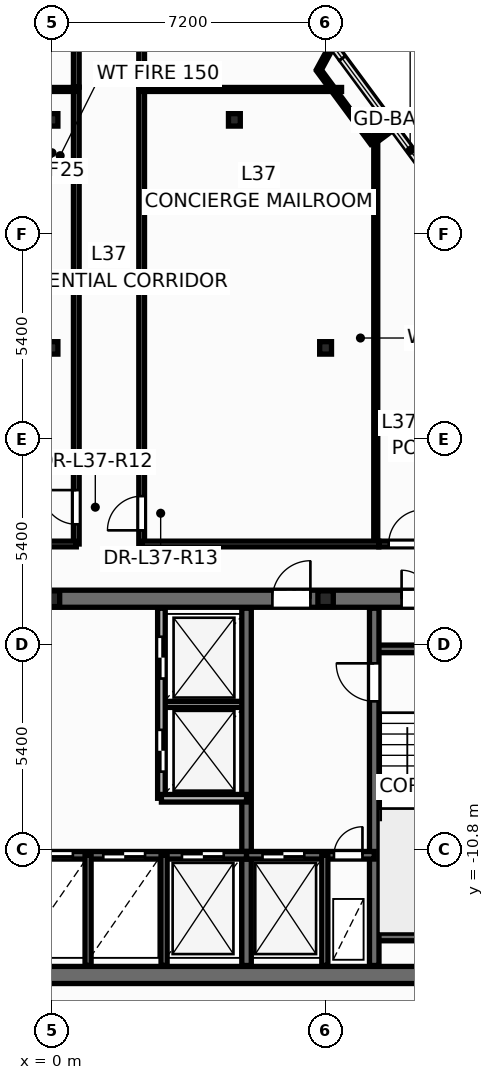
"""IFC4 building model, lengths in metres.
Left out: names, types, materials, properties, quantities, classifications, styles, units other than length and angle.
Written with IfcOpenShell. Run it as: python <this file> out.ifc"""

import sys

from ifc_helpers import new_model, si_unit, direction, frame, frame_2d, origin, origin_2d, place, context, subcontext, project, spatial, rectangle, i_section, extrude, element, fill, save


model = new_model("IFC4")
c1 = context("Model", 3, precision=1e-05, world=origin(), true_north=direction((0.0, 1.0)))
c2 = subcontext(c1, "Body", "Model", "MODEL_VIEW")
j1 = project(units=[si_unit("LENGTHUNIT", "METRE"), si_unit("PLANEANGLEUNIT", "RADIAN")], contexts=[c1])
p1 = place(None, origin())
s1 = spatial("IfcSite", under=j1, at=p1, CompositionType="ELEMENT")
p2 = place(p1, origin())
s2 = spatial("IfcBuilding", under=s1, at=p2, CompositionType="ELEMENT")
p3 = place(p2, frame((0.0, 0.0, 143.7)))
s3 = spatial("IfcBuildingStorey", under=s2, at=p3, CompositionType="ELEMENT", Elevation=143.7)
for number, where, z_axis, x_axis in (
    (1, (0.0, -4.2, 0.0), (0.0, 0.0, 1.0), (1.0, 0.0, 0.0)),
    (2, (7.2, -4.2, 0.0), (0.0, 0.0, 1.0), (1.0, 0.0, 0.0)),
):
    element("IfcColumn", number, at=place(p3, frame(where, z_axis=z_axis, x_axis=x_axis)), inside=s3, PredefinedType="PILASTER", context=c2, shape_type="SweptSolid", body=[
        extrude(i_section(OverallWidth=0.405, OverallDepth=0.414, WebThickness=0.022, FlangeThickness=0.032, at=origin_2d()), origin(), (0.0, 0.0, 1.0), 3.6),
    ])
for number, where, z_axis, x_axis in (
    (3, (0.0, 2.4, 0.0), (0.0, 0.0, 1.0), (1.0, 0.0, 0.0)),
    (4, (7.2, 2.4, 0.0), (0.0, 0.0, 1.0), (1.0, 0.0, 0.0)),
    (5, (0.0, 8.4, 0.0), (0.0, 0.0, 1.0), (1.0, 0.0, 0.0)),
    (6, (4.8, 8.4, 0.0), (0.0, 0.0, 1.0), (1.0, 0.0, 0.0)),
):
    element("IfcColumn", number, at=place(p3, frame(where, z_axis=z_axis, x_axis=x_axis)), inside=s3, PredefinedType="COLUMN", context=c2, shape_type="SweptSolid", body=[
        extrude(i_section(OverallWidth=0.311, OverallDepth=0.327, WebThickness=0.016, FlangeThickness=0.025, at=origin_2d()), origin(), (0.0, 0.0, 1.0), 3.6),
    ])
p4 = place(p3, frame((2.88, -6.98, 0.0), z_axis=(0.0, 0.0, 1.0), x_axis=(1.0, 0.0, 0.0)))
e7 = element("IfcWall", 7, at=p4, inside=s3, PredefinedType="PARTITIONING", context=c2, shape_type="SweptSolid", body=[
    extrude(rectangle(XDim=2.24, YDim=0.16, at=frame_2d((1.12, 0.0))), origin(), (0.0, 0.0, 1.0), 3.35),
])
p5 = place(p3, frame((-12.65, -14.1, 0.0), z_axis=(0.0, 0.0, 1.0), x_axis=(1.0, 0.0, 0.0)))
e8 = element("IfcWall", 8, at=p5, inside=s3, PredefinedType="SHEAR", context=c2, shape_type="SweptSolid", body=[
    extrude(rectangle(XDim=25.3, YDim=0.45, at=frame_2d((12.65, 0.0))), origin(), (0.0, 0.0, 1.0), 3.6),
])
p6 = place(p3, frame((-12.65, -4.2, 0.0), z_axis=(0.0, 0.0, 1.0), x_axis=(1.0, 0.0, 0.0)))
e9 = element("IfcWall", 9, at=p6, inside=s3, PredefinedType="SHEAR", context=c2, shape_type="SweptSolid", body=[
    extrude(rectangle(XDim=25.3, YDim=0.45, at=frame_2d((12.65, 0.0))), origin(), (0.0, 0.0, 1.0), 3.6),
])
p7 = place(p6, frame((1.85, 0.0, 0.0)))
e10 = element("IfcOpeningElement", 10, at=p7, cuts=e9, PredefinedType="OPENING", context=c2, shape_type="SweptSolid", body=[
    extrude(rectangle(XDim=0.756, YDim=2.054, at=frame_2d((0.375, 1.027))), frame((0.0, 0.235, 0.0), z_axis=(0.0, -1.0, 0.0), x_axis=(1.0, 0.0, 0.0)), (0.0, 0.0, 1.0), 0.47),
])
p8 = place(p6, frame((21.85, 0.0, 0.0)))
e11 = element("IfcOpeningElement", 11, at=p8, cuts=e9, PredefinedType="OPENING", context=c2, shape_type="SweptSolid", body=[
    extrude(rectangle(XDim=0.756, YDim=2.054, at=frame_2d((0.375, 1.027))), frame((0.0, 0.235, 0.0), z_axis=(0.0, -1.0, 0.0), x_axis=(1.0, 0.0, 0.0)), (0.0, 0.0, 1.0), 0.47),
])
p9 = place(p6, frame((23.5, 0.0, 0.0)))
e12 = element("IfcOpeningElement", 12, at=p9, cuts=e9, PredefinedType="OPENING", context=c2, shape_type="SweptSolid", body=[
    extrude(rectangle(XDim=0.756, YDim=2.054, at=frame_2d((0.375, 1.027))), frame((0.0, 0.235, 0.0), z_axis=(0.0, -1.0, 0.0), x_axis=(1.0, 0.0, 0.0)), (0.0, 0.0, 1.0), 0.47),
])
p10 = place(p6, frame((5.85, 0.0, 0.0)))
e13 = element("IfcOpeningElement", 13, at=p10, cuts=e9, PredefinedType="OPENING", context=c2, shape_type="SweptSolid", body=[
    extrude(rectangle(XDim=1.006, YDim=2.104, at=frame_2d((0.5, 1.052))), frame((0.0, 0.235, 0.0), z_axis=(0.0, -1.0, 0.0), x_axis=(1.0, 0.0, 0.0)), (0.0, 0.0, 1.0), 0.47),
])
p11 = place(p6, frame((10.35, 0.0, 0.0)))
e14 = element("IfcOpeningElement", 14, at=p11, cuts=e9, PredefinedType="OPENING", context=c2, shape_type="SweptSolid", body=[
    extrude(rectangle(XDim=1.406, YDim=2.154, at=frame_2d((0.7, 1.077))), frame((0.0, 0.235, 0.0), z_axis=(0.0, -1.0, 0.0), x_axis=(1.0, 0.0, 0.0)), (0.0, 0.0, 1.0), 0.47),
])
p12 = place(p6, frame((18.45, 0.0, 0.0)))
e15 = element("IfcOpeningElement", 15, at=p12, cuts=e9, PredefinedType="OPENING", context=c2, shape_type="SweptSolid", body=[
    extrude(rectangle(XDim=1.006, YDim=2.104, at=frame_2d((0.5, 1.052))), frame((0.0, 0.235, 0.0), z_axis=(0.0, -1.0, 0.0), x_axis=(1.0, 0.0, 0.0)), (0.0, 0.0, 1.0), 0.47),
])
for number, where, z_axis, x_axis in (
    (16, (8.48, -5.52, 0.0), (0.0, 0.0, 1.0), (1.0, 0.0, 0.0)),
    (17, (8.48, -13.1, 0.0), (0.0, 0.0, 1.0), (1.0, 0.0, 0.0)),
):
    element("IfcWall", number, at=place(p3, frame(where, z_axis=z_axis, x_axis=x_axis)), inside=s3, PredefinedType="SOLIDWALL", context=c2, shape_type="SweptSolid", body=[
        extrude(rectangle(XDim=3.87, YDim=0.2, at=frame_2d((1.935, 0.0))), origin(), (0.0, 0.0, 1.0), 3.6),
    ])
p13 = place(p3, frame((8.48, -13.85, 0.0), z_axis=(0.0, 0.0, 1.0), x_axis=(0.0, 1.0, 0.0)))
e18 = element("IfcWall", 18, at=p13, inside=s3, PredefinedType="SHEAR", context=c2, shape_type="SweptSolid", body=[
    extrude(rectangle(XDim=9.4, YDim=0.25, at=frame_2d((4.7, 0.0))), origin(), (0.0, 0.0, 1.0), 3.6),
])
p14 = place(p13, frame((6.95, 0.0, 0.0)))
e19 = element("IfcOpeningElement", 19, at=p14, cuts=e18, PredefinedType="OPENING", context=c2, shape_type="SweptSolid", body=[
    extrude(rectangle(XDim=1.006, YDim=2.104, at=frame_2d((0.5, 1.052))), frame((0.0, 0.135, 0.0), z_axis=(0.0, -1.0, 0.0), x_axis=(1.0, 0.0, 0.0)), (0.0, 0.0, 1.0), 0.27),
])
p15 = place(p3, frame((5.12, -13.85, 0.0), z_axis=(0.0, 0.0, 1.0), x_axis=(0.0, 1.0, 0.0)))
e20 = element("IfcWall", 20, at=p15, inside=s3, PredefinedType="SHEAR", context=c2, shape_type="SweptSolid", body=[
    extrude(rectangle(XDim=9.4, YDim=0.25, at=frame_2d((4.7, 0.0))), origin(), (0.0, 0.0, 1.0), 3.6),
])
p16 = place(p3, frame((-5.12, -10.95, 0.0), z_axis=(0.0, 0.0, 1.0), x_axis=(1.0, 0.0, 0.0)))
e21 = element("IfcWall", 21, at=p16, inside=s3, PredefinedType="SOLIDWALL", context=c2, shape_type="SweptSolid", body=[
    extrude(rectangle(XDim=10.24, YDim=0.2, at=frame_2d((5.12, 0.0))), origin(), (0.0, 0.0, 1.0), 3.6),
])
p17 = place(p16, frame((0.6, 0.0, 0.0)))
e22 = element("IfcOpeningElement", 22, at=p17, cuts=e21, PredefinedType="OPENING", context=c2, shape_type="SweptSolid", body=[
    extrude(rectangle(XDim=1.106, YDim=2.104, at=frame_2d((0.55, 1.052))), frame((0.0, 0.11, 0.0), z_axis=(0.0, -1.0, 0.0), x_axis=(1.0, 0.0, 0.0)), (0.0, 0.0, 1.0), 0.22),
])
p18 = place(p16, frame((2.67, 0.0, 0.0)))
e23 = element("IfcOpeningElement", 23, at=p18, cuts=e21, PredefinedType="OPENING", context=c2, shape_type="SweptSolid", body=[
    extrude(rectangle(XDim=1.106, YDim=2.104, at=frame_2d((0.55, 1.052))), frame((0.0, 0.11, 0.0), z_axis=(0.0, -1.0, 0.0), x_axis=(1.0, 0.0, 0.0)), (0.0, 0.0, 1.0), 0.22),
])
p19 = place(p16, frame((4.57, 0.0, 0.0)))
e24 = element("IfcOpeningElement", 24, at=p19, cuts=e21, PredefinedType="OPENING", context=c2, shape_type="SweptSolid", body=[
    extrude(rectangle(XDim=1.106, YDim=2.104, at=frame_2d((0.55, 1.052))), frame((0.0, 0.11, 0.0), z_axis=(0.0, -1.0, 0.0), x_axis=(1.0, 0.0, 0.0)), (0.0, 0.0, 1.0), 0.22),
])
p20 = place(p16, frame((6.47, 0.0, 0.0)))
e25 = element("IfcOpeningElement", 25, at=p20, cuts=e21, PredefinedType="OPENING", context=c2, shape_type="SweptSolid", body=[
    extrude(rectangle(XDim=1.106, YDim=2.104, at=frame_2d((0.55, 1.052))), frame((0.0, 0.11, 0.0), z_axis=(0.0, -1.0, 0.0), x_axis=(1.0, 0.0, 0.0)), (0.0, 0.0, 1.0), 0.22),
])
p21 = place(p16, frame((8.54, 0.0, 0.0)))
e26 = element("IfcOpeningElement", 26, at=p21, cuts=e21, PredefinedType="OPENING", context=c2, shape_type="SweptSolid", body=[
    extrude(rectangle(XDim=1.106, YDim=2.104, at=frame_2d((0.55, 1.052))), frame((0.0, 0.11, 0.0), z_axis=(0.0, -1.0, 0.0), x_axis=(1.0, 0.0, 0.0)), (0.0, 0.0, 1.0), 0.22),
])
p22 = place(p3, frame((5.12, -10.95, 0.0), z_axis=(0.0, 0.0, 1.0), x_axis=(1.0, 0.0, 0.0)))
e27 = element("IfcWall", 27, at=p22, inside=s3, PredefinedType="SOLIDWALL", context=c2, shape_type="SweptSolid", body=[
    extrude(rectangle(XDim=3.36, YDim=0.2, at=frame_2d((1.68, 0.0))), origin(), (0.0, 0.0, 1.0), 3.6),
])
p23 = place(p22, frame((0.42, 0.0, 0.0)))
e28 = element("IfcOpeningElement", 28, at=p23, cuts=e27, PredefinedType="OPENING", context=c2, shape_type="SweptSolid", body=[
    extrude(rectangle(XDim=1.106, YDim=2.104, at=frame_2d((0.55, 1.052))), frame((0.0, 0.11, 0.0), z_axis=(0.0, -1.0, 0.0), x_axis=(1.0, 0.0, 0.0)), (0.0, 0.0, 1.0), 0.22),
])
p24 = place(p22, frame((2.3, 0.0, 0.0)))
e29 = element("IfcOpeningElement", 29, at=p24, cuts=e27, PredefinedType="OPENING", context=c2, shape_type="SweptSolid", body=[
    extrude(rectangle(XDim=0.756, YDim=2.054, at=frame_2d((0.375, 1.027))), frame((0.0, 0.11, 0.0), z_axis=(0.0, -1.0, 0.0), x_axis=(1.0, 0.0, 0.0)), (0.0, 0.0, 1.0), 0.22),
])
for number, where, z_axis, x_axis in (
    (30, (7.18, -13.85, 0.0), (0.0, 0.0, 1.0), (0.0, 1.0, 0.0)),
    (31, (2.95, -13.85, 0.0), (0.0, 0.0, 1.0), (0.0, 1.0, 0.0)),
):
    element("IfcWall", number, at=place(p3, frame(where, z_axis=z_axis, x_axis=x_axis)), inside=s3, PredefinedType="PARTITIONING", context=c2, shape_type="SweptSolid", body=[
        extrude(rectangle(XDim=2.9, YDim=0.16, at=frame_2d((1.45, 0.0))), origin(), (0.0, 0.0, 1.0), 2.475),
    ])
p25 = place(p3, frame((2.88, -9.45, 0.0), z_axis=(0.0, 0.0, 1.0), x_axis=(0.0, 1.0, 0.0)))
e32 = element("IfcWall", 32, at=p25, inside=s3, PredefinedType="SOLIDWALL", context=c2, shape_type="SweptSolid", body=[
    extrude(rectangle(XDim=5.0, YDim=0.2, at=frame_2d((2.5, 0.0))), origin(), (0.0, 0.0, 1.0), 3.35),
])
p26 = place(p25, frame((0.7, 0.0, 0.0)))
e33 = element("IfcOpeningElement", 33, at=p26, cuts=e32, PredefinedType="OPENING", context=c2, shape_type="SweptSolid", body=[
    extrude(rectangle(XDim=1.106, YDim=2.104, at=frame_2d((0.55, 1.052))), frame((0.0, 0.11, 0.0), z_axis=(0.0, -1.0, 0.0), x_axis=(1.0, 0.0, 0.0)), (0.0, 0.0, 1.0), 0.22),
])
p27 = place(p25, frame((3.15, 0.0, 0.0)))
e34 = element("IfcOpeningElement", 34, at=p27, cuts=e32, PredefinedType="OPENING", context=c2, shape_type="SweptSolid", body=[
    extrude(rectangle(XDim=1.106, YDim=2.104, at=frame_2d((0.55, 1.052))), frame((0.0, 0.11, 0.0), z_axis=(0.0, -1.0, 0.0), x_axis=(1.0, 0.0, 0.0)), (0.0, 0.0, 1.0), 0.22),
])
p28 = place(p3, frame((2.88, -9.45, 0.0), z_axis=(0.0, 0.0, 1.0), x_axis=(1.0, 0.0, 0.0)))
e35 = element("IfcWall", 35, at=p28, inside=s3, PredefinedType="SOLIDWALL", context=c2, shape_type="SweptSolid", body=[
    extrude(rectangle(XDim=2.24, YDim=0.2, at=frame_2d((1.12, 0.0))), origin(), (0.0, 0.0, 1.0), 3.35),
])
p29 = place(p3, frame((0.95, -13.85, 0.0), z_axis=(0.0, 0.0, 1.0), x_axis=(0.0, 1.0, 0.0)))
e36 = element("IfcWall", 36, at=p29, inside=s3, PredefinedType="PARTITIONING", context=c2, shape_type="SweptSolid", body=[
    extrude(rectangle(XDim=2.9, YDim=0.16, at=frame_2d((1.45, 0.0))), origin(), (0.0, 0.0, 1.0), 2.475),
])
p30 = place(p3, frame((0.64, -2.76, 0.0), z_axis=(0.0, 0.0, 1.0), x_axis=(0.0, 1.0, 0.0)))
e37 = element("IfcWall", 37, at=p30, inside=s3, PredefinedType="PARTITIONING", context=c2, shape_type="SweptSolid", body=[
    extrude(rectangle(XDim=12.02, YDim=0.15, at=frame_2d((6.01, 0.0))), origin(), (0.0, 0.0, 1.0), 2.325),
])
p31 = place(p30, frame((0.519, 0.0, 0.0)))
e38 = element("IfcOpeningElement", 38, at=p31, cuts=e37, PredefinedType="OPENING", context=c2, shape_type="SweptSolid", body=[
    extrude(rectangle(XDim=0.906, YDim=2.104, at=frame_2d((0.45, 1.052))), frame((0.0, 0.085, 0.0), z_axis=(0.0, -1.0, 0.0), x_axis=(1.0, 0.0, 0.0)), (0.0, 0.0, 1.0), 0.17),
])
p32 = place(p3, frame((2.36, -2.76, 0.0), z_axis=(0.0, 0.0, 1.0), x_axis=(0.0, 1.0, 0.0)))
e39 = element("IfcWall", 39, at=p32, inside=s3, PredefinedType="PARTITIONING", context=c2, shape_type="SweptSolid", body=[
    extrude(rectangle(XDim=12.02, YDim=0.15, at=frame_2d((6.01, 0.0))), origin(), (0.0, 0.0, 1.0), 2.325),
])
p33 = place(p32, frame((0.359, 0.0, 0.0)))
e40 = element("IfcOpeningElement", 40, at=p33, cuts=e39, PredefinedType="OPENING", context=c2, shape_type="SweptSolid", body=[
    extrude(rectangle(XDim=0.906, YDim=2.104, at=frame_2d((0.45, 1.052))), frame((0.0, 0.085, 0.0), z_axis=(0.0, -1.0, 0.0), x_axis=(1.0, 0.0, 0.0)), (0.0, 0.0, 1.0), 0.17),
])
p34 = place(p3, frame((8.52, -2.76, 0.0), z_axis=(0.0, 0.0, 1.0), x_axis=(0.0, 1.0, 0.0)))
e41 = element("IfcWall", 41, at=p34, inside=s3, PredefinedType="PARTITIONING", context=c2, shape_type="SweptSolid", body=[
    extrude(rectangle(XDim=10.84, YDim=0.105, at=frame_2d((5.42, 0.0))), origin(), (0.0, 0.0, 1.0), 2.617),
])
p35 = place(p3, frame((-8.62, -2.76, 0.0), z_axis=(0.0, 0.0, 1.0), x_axis=(1.0, 0.0, 0.0)))
e42 = element("IfcWall", 42, at=p35, inside=s3, PredefinedType="PARTITIONING", context=c2, shape_type="SweptSolid", body=[
    extrude(rectangle(XDim=9.26, YDim=0.15, at=frame_2d((4.63, 0.0))), origin(), (0.0, 0.0, 1.0), 2.325),
])
p36 = place(p3, frame((-6.02, 9.2, 0.0), z_axis=(0.0, 0.0, 1.0), x_axis=(1.0, 0.0, 0.0)))
e43 = element("IfcWall", 43, at=p36, inside=s3, PredefinedType="PARTITIONING", context=c2, shape_type="SweptSolid", body=[
    extrude(rectangle(XDim=6.66, YDim=0.105, at=frame_2d((3.33, 0.0))), origin(), (0.0, 0.0, 1.0), 2.617),
])
p37 = place(p3, frame((2.36, -2.76, 0.0), z_axis=(0.0, 0.0, 1.0), x_axis=(1.0, 0.0, 0.0)))
e44 = element("IfcWall", 44, at=p37, inside=s3, PredefinedType="PARTITIONING", context=c2, shape_type="SweptSolid", body=[
    extrude(rectangle(XDim=6.24, YDim=0.15, at=frame_2d((3.12, 0.0))), origin(), (0.0, 0.0, 1.0), 2.325),
])
p38 = place(p3, frame((8.602, -2.76, 0.0), z_axis=(0.0, 0.0, 1.0), x_axis=(1.0, 0.0, 0.0)))
e45 = element("IfcWall", 45, at=p38, inside=s3, PredefinedType="PARTITIONING", context=c2, shape_type="SweptSolid", body=[
    extrude(rectangle(XDim=6.038, YDim=0.15, at=frame_2d((3.019, 0.0))), origin(), (0.0, 0.0, 1.0), 3.35),
])
p39 = place(p38, frame((0.258, 0.0, 0.0)))
e46 = element("IfcOpeningElement", 46, at=p39, cuts=e45, PredefinedType="OPENING", context=c2, shape_type="SweptSolid", body=[
    extrude(rectangle(XDim=0.906, YDim=2.104, at=frame_2d((0.45, 1.052))), frame((0.0, 0.085, 0.0), z_axis=(0.0, -1.0, 0.0), x_axis=(1.0, 0.0, 0.0)), (0.0, 0.0, 1.0), 0.17),
])
p40 = place(p3, frame((2.36, 9.2, 0.0), z_axis=(0.0, 0.0, 1.0), x_axis=(1.0, 0.0, 0.0)))
e47 = element("IfcWall", 47, at=p40, inside=s3, PredefinedType="PARTITIONING", context=c2, shape_type="SweptSolid", body=[
    extrude(rectangle(XDim=5.26, YDim=0.105, at=frame_2d((2.63, 0.0))), origin(), (0.0, 0.0, 1.0), 2.617),
])
p41 = place(p3, frame((0.64, 9.262, 0.0), z_axis=(0.0, 0.0, 1.0), x_axis=(0.0, 1.0, 0.0)))
e48 = element("IfcWall", 48, at=p41, inside=s3, PredefinedType="PARTITIONING", context=c2, shape_type="SweptSolid", body=[
    extrude(rectangle(XDim=2.538, YDim=0.15, at=frame_2d((1.269, 0.0))), origin(), (0.0, 0.0, 1.0), 3.35),
])
p42 = place(p41, frame((1.05, 0.0, 0.0)))
e49 = element("IfcOpeningElement", 49, at=p42, cuts=e48, PredefinedType="OPENING", context=c2, shape_type="SweptSolid", body=[
    extrude(rectangle(XDim=0.906, YDim=2.104, at=frame_2d((0.45, 1.052))), frame((0.0, 0.085, 0.0), z_axis=(0.0, -1.0, 0.0), x_axis=(1.0, 0.0, 0.0)), (0.0, 0.0, 1.0), 0.17),
])
p43 = place(p3, frame((2.36, 9.262, 0.0), z_axis=(0.0, 0.0, 1.0), x_axis=(0.0, 1.0, 0.0)))
e50 = element("IfcWall", 50, at=p43, inside=s3, PredefinedType="PARTITIONING", context=c2, shape_type="SweptSolid", body=[
    extrude(rectangle(XDim=2.538, YDim=0.15, at=frame_2d((1.269, 0.0))), origin(), (0.0, 0.0, 1.0), 3.35),
])
p44 = place(p3, frame((8.432, 7.798, 0.0), z_axis=(0.0, 0.0, 1.0), x_axis=(-0.594168747529, 0.804340412674, 0.0)))
e51 = element("IfcWall", 51, at=p44, inside=s3, PredefinedType="PARTITIONING", context=c2, shape_type="SweptSolid", body=[
    extrude(rectangle(XDim=2.378, YDim=0.12, at=frame_2d((1.189, 0.0))), origin(), (0.0, 0.0, 1.0), 3.35),
])
p45 = place(p3, frame((7.019, 9.71, 0.0), z_axis=(0.0, 0.0, 1.0), x_axis=(0.476400054493, 0.879228632427, 0.0)))
e52 = element("IfcWall", 52, at=p45, inside=s3, PredefinedType="PARTITIONING", context=c2, shape_type="SweptSolid", body=[
    extrude(rectangle(XDim=0.74, YDim=0.12, at=frame_2d((0.37, 0.0))), origin(), (0.0, 0.0, 1.0), 2.792),
])
p46 = place(p3, frame((8.971, 8.196, 0.0), z_axis=(0.0, 0.0, 1.0), x_axis=(-0.804395751644, -0.594093826543, 0.0)))
e53 = element("IfcWall", 53, at=p46, inside=s3, PredefinedType="PARTITIONING", context=c2, shape_type="SweptSolid", body=[
    extrude(rectangle(XDim=0.67, YDim=0.12, at=frame_2d((0.335, 0.0))), origin(), (0.0, 0.0, 1.0), 2.792),
])
p47 = place(p26, origin())
e54 = element("IfcDoor", 54, at=p47, inside=s3, OperationType="DOUBLE_DOOR_SLIDING", PredefinedType="DOOR", context=c2, shape_type="SweptSolid", body=[
    extrude(rectangle(XDim=1.1, YDim=2.1, at=frame_2d((0.55, 1.05))), frame((0.0, 0.025, 0.0), z_axis=(0.0, -1.0, 0.0), x_axis=(1.0, 0.0, 0.0)), (0.0, 0.0, 1.0), 0.05),
])
fill(e33, e54)
p48 = place(p27, origin())
e55 = element("IfcDoor", 55, at=p48, inside=s3, OperationType="DOUBLE_DOOR_SLIDING", PredefinedType="DOOR", context=c2, shape_type="SweptSolid", body=[
    extrude(rectangle(XDim=1.1, YDim=2.1, at=frame_2d((0.55, 1.05))), frame((0.0, 0.025, 0.0), z_axis=(0.0, -1.0, 0.0), x_axis=(1.0, 0.0, 0.0)), (0.0, 0.0, 1.0), 0.05),
])
fill(e34, e55)
p49 = place(p14, origin())
e56 = element("IfcDoor", 56, at=p49, inside=s3, OperationType="SINGLE_SWING_RIGHT", PredefinedType="DOOR", context=c2, shape_type="SweptSolid", body=[
    extrude(rectangle(XDim=1.0, YDim=2.1, at=frame_2d((0.5, 1.05))), frame((0.0, 0.025, 0.0), z_axis=(0.0, -1.0, 0.0), x_axis=(1.0, 0.0, 0.0)), (0.0, 0.0, 1.0), 0.05),
])
fill(e19, e56)
p50 = place(p23, origin())
e57 = element("IfcDoor", 57, at=p50, inside=s3, OperationType="DOUBLE_DOOR_SLIDING", PredefinedType="DOOR", context=c2, shape_type="SweptSolid", body=[
    extrude(rectangle(XDim=1.1, YDim=2.1, at=frame_2d((0.55, 1.05))), frame((0.0, 0.025, 0.0), z_axis=(0.0, -1.0, 0.0), x_axis=(1.0, 0.0, 0.0)), (0.0, 0.0, 1.0), 0.05),
])
fill(e28, e57)
p51 = place(p24, origin())
e58 = element("IfcDoor", 58, at=p51, inside=s3, OperationType="SINGLE_SWING_RIGHT", PredefinedType="DOOR", context=c2, shape_type="SweptSolid", body=[
    extrude(rectangle(XDim=0.75, YDim=2.05, at=frame_2d((0.375, 1.025))), frame((0.0, 0.025, 0.0), z_axis=(0.0, -1.0, 0.0), x_axis=(1.0, 0.0, 0.0)), (0.0, 0.0, 1.0), 0.05),
])
fill(e29, e58)
p52 = place(p19, origin())
e59 = element("IfcDoor", 59, at=p52, inside=s3, OperationType="DOUBLE_DOOR_SLIDING", PredefinedType="DOOR", context=c2, shape_type="SweptSolid", body=[
    extrude(rectangle(XDim=1.1, YDim=2.1, at=frame_2d((0.55, 1.05))), frame((0.0, 0.025, 0.0), z_axis=(0.0, -1.0, 0.0), x_axis=(1.0, 0.0, 0.0)), (0.0, 0.0, 1.0), 0.05),
])
fill(e24, e59)
p53 = place(p20, origin())
e60 = element("IfcDoor", 60, at=p53, inside=s3, OperationType="DOUBLE_DOOR_SLIDING", PredefinedType="DOOR", context=c2, shape_type="SweptSolid", body=[
    extrude(rectangle(XDim=1.1, YDim=2.1, at=frame_2d((0.55, 1.05))), frame((0.0, 0.025, 0.0), z_axis=(0.0, -1.0, 0.0), x_axis=(1.0, 0.0, 0.0)), (0.0, 0.0, 1.0), 0.05),
])
fill(e25, e60)
p54 = place(p21, origin())
e61 = element("IfcDoor", 61, at=p54, inside=s3, OperationType="DOUBLE_DOOR_SLIDING", PredefinedType="DOOR", context=c2, shape_type="SweptSolid", body=[
    extrude(rectangle(XDim=1.1, YDim=2.1, at=frame_2d((0.55, 1.05))), frame((0.0, 0.025, 0.0), z_axis=(0.0, -1.0, 0.0), x_axis=(1.0, 0.0, 0.0)), (0.0, 0.0, 1.0), 0.05),
])
fill(e26, e61)
p55 = place(p8, origin())
e62 = element("IfcDoor", 62, at=p55, inside=s3, OperationType="SINGLE_SWING_LEFT", PredefinedType="DOOR", context=c2, shape_type="SweptSolid", body=[
    extrude(rectangle(XDim=0.75, YDim=2.05, at=frame_2d((0.375, 1.025))), frame((0.0, 0.025, 0.0), z_axis=(0.0, -1.0, 0.0), x_axis=(1.0, 0.0, 0.0)), (0.0, 0.0, 1.0), 0.05),
])
fill(e11, e62)
p56 = place(p12, origin())
e63 = element("IfcDoor", 63, at=p56, inside=s3, OperationType="SINGLE_SWING_RIGHT", PredefinedType="DOOR", context=c2, shape_type="SweptSolid", body=[
    extrude(rectangle(XDim=1.0, YDim=2.1, at=frame_2d((0.5, 1.05))), frame((0.0, 0.025, 0.0), z_axis=(0.0, -1.0, 0.0), x_axis=(1.0, 0.0, 0.0)), (0.0, 0.0, 1.0), 0.05),
])
fill(e15, e63)
p57 = place(p31, origin())
e64 = element("IfcDoor", 64, at=p57, inside=s3, OperationType="SINGLE_SWING_RIGHT", PredefinedType="DOOR", context=c2, shape_type="SweptSolid", body=[
    extrude(rectangle(XDim=0.9, YDim=2.1, at=frame_2d((0.45, 1.05))), frame((0.0, 0.025, 0.0), z_axis=(0.0, -1.0, 0.0), x_axis=(1.0, 0.0, 0.0)), (0.0, 0.0, 1.0), 0.05),
])
fill(e38, e64)
p58 = place(p33, origin())
e65 = element("IfcDoor", 65, at=p58, inside=s3, OperationType="SINGLE_SWING_LEFT", PredefinedType="DOOR", context=c2, shape_type="SweptSolid", body=[
    extrude(rectangle(XDim=0.9, YDim=2.1, at=frame_2d((0.45, 1.05))), frame((0.0, 0.025, 0.0), z_axis=(0.0, -1.0, 0.0), x_axis=(1.0, 0.0, 0.0)), (0.0, 0.0, 1.0), 0.05),
])
fill(e40, e65)
p59 = place(p39, origin())
e66 = element("IfcDoor", 66, at=p59, inside=s3, OperationType="SINGLE_SWING_RIGHT", PredefinedType="DOOR", context=c2, shape_type="SweptSolid", body=[
    extrude(rectangle(XDim=0.9, YDim=2.1, at=frame_2d((0.45, 1.05))), frame((0.0, 0.025, 0.0), z_axis=(0.0, -1.0, 0.0), x_axis=(1.0, 0.0, 0.0)), (0.0, 0.0, 1.0), 0.05),
])
fill(e46, e66)
save(model, sys.argv[1])
